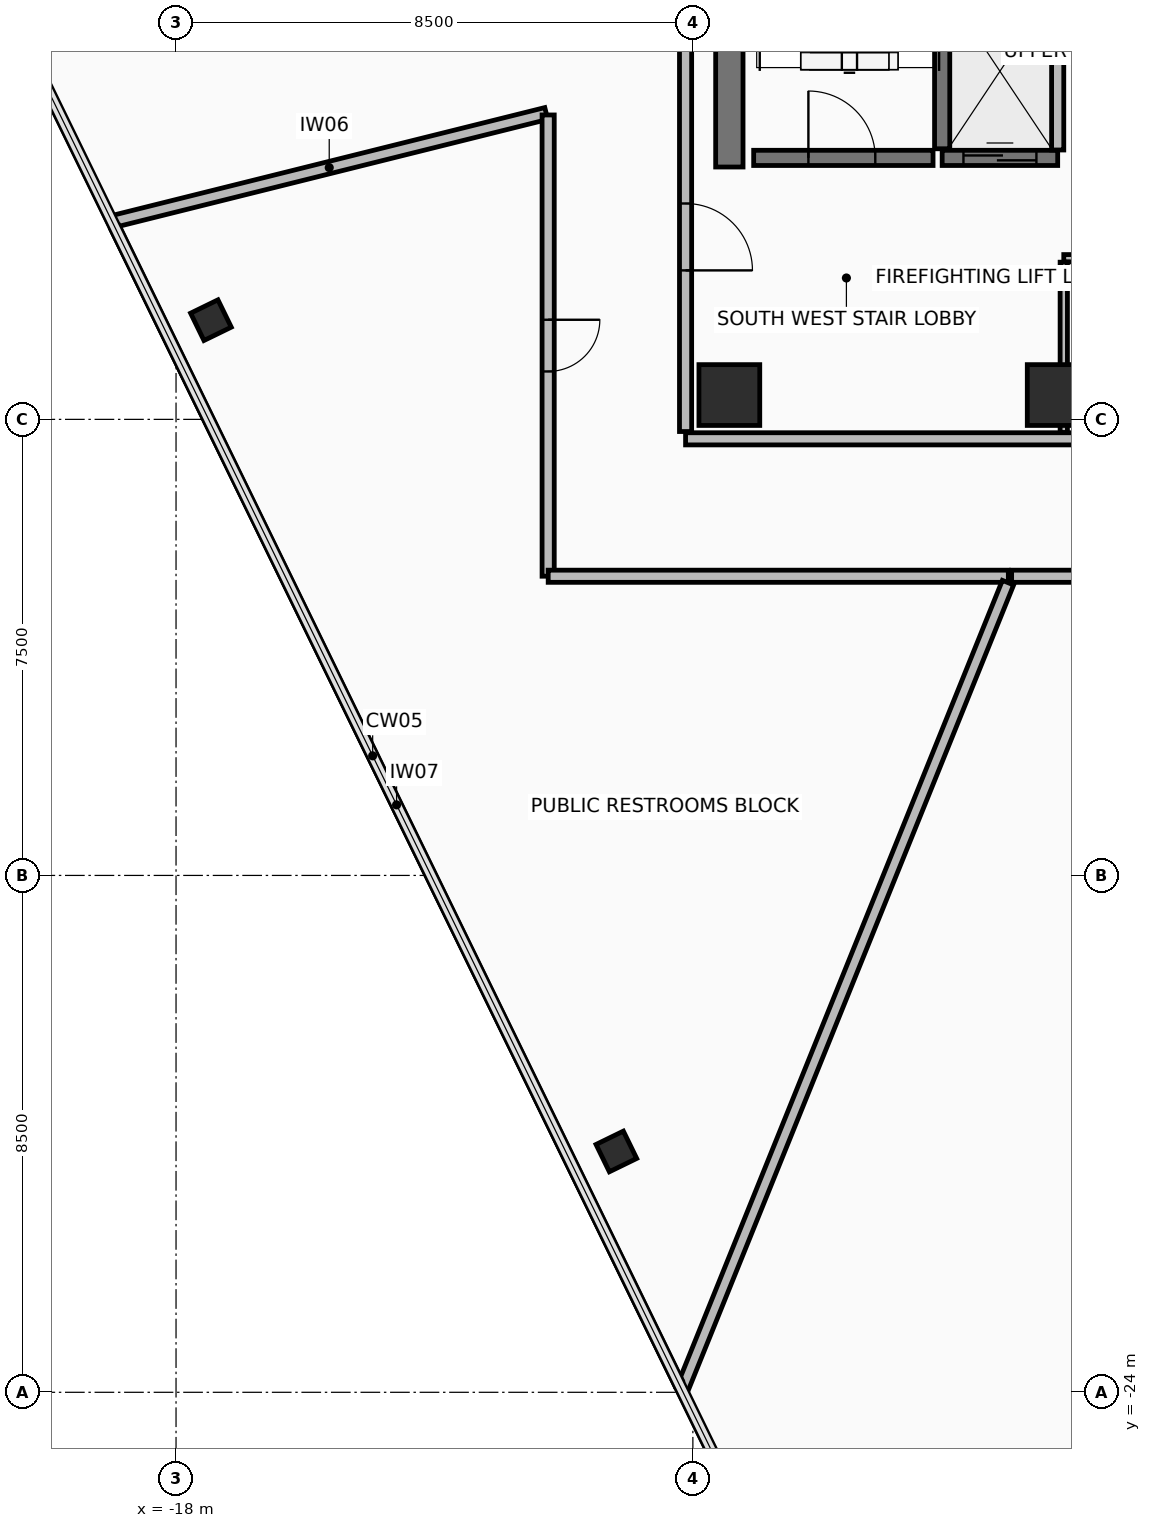
"""IFC4 building model, lengths in metres.
Left out: names, types, materials, properties, quantities, classifications, styles, units other than length and angle.
Written with IfcOpenShell. Run it as: python <this file> out.ifc"""

import sys

from ifc_helpers import new_model, si_unit, direction, frame, frame_2d, origin, origin_2d, place, context, subcontext, project, spatial, rectangle, hollow_rectangle, extrude, element, fill, save


model = new_model("IFC4")
c1 = context("Model", 3, precision=1e-05, world=origin(), true_north=direction((0.0, 1.0)))
c2 = subcontext(c1, "Body", "Model", "MODEL_VIEW")
j1 = project(units=[si_unit("LENGTHUNIT", "METRE"), si_unit("PLANEANGLEUNIT", "RADIAN")], contexts=[c1])
p1 = place(None, origin())
s1 = spatial("IfcSite", under=j1, at=p1, CompositionType="ELEMENT")
p2 = place(p1, origin())
s2 = spatial("IfcBuilding", under=s1, at=p2, CompositionType="ELEMENT")
p3 = place(p2, frame((0.0, 0.0, 248.65)))
s3 = spatial("IfcBuildingStorey", under=s2, at=p3, CompositionType="ELEMENT", Elevation=248.65)
for number, where, z_axis, x_axis in (
    (1, (-8.9, -7.6, 0.0), (0.0, 0.0, 1.0), (1.0, 0.0, 0.0)),
    (2, (-3.5, -7.6, 0.0), (0.0, 0.0, 1.0), (1.0, 0.0, 0.0)),
):
    element("IfcColumn", number, at=place(p3, frame(where, z_axis=z_axis, x_axis=x_axis)), inside=s3, PredefinedType="COLUMN", context=c2, shape_type="SweptSolid", body=[
        extrude(rectangle(XDim=1.0, YDim=1.0, at=origin_2d()), origin(), (0.0, 0.0, 1.0), 4.75),
    ])
for number, where, z_axis, x_axis in (
    (3, (-17.426, -6.369, 0.0), (0.0, 0.0, 1.0), (-0.438, 0.899, 0.0)),
    (4, (-10.758, -20.039, 0.0), (0.0, 0.0, 1.0), (-0.438, 0.899, 0.0)),
):
    element("IfcColumn", number, at=place(p3, frame(where, z_axis=z_axis, x_axis=x_axis)), inside=s3, PredefinedType="COLUMN", context=c2, shape_type="SweptSolid", body=[
        extrude(hollow_rectangle(XDim=0.5, YDim=0.5, WallThickness=0.032, at=origin_2d()), origin(), (0.0, 0.0, 1.0), 4.75),
    ])
p4 = place(p3, frame((-8.9, -3.85, 0.0), z_axis=(0.0, 0.0, 1.0), x_axis=(0.0, 1.0, 0.0)))
e5 = element("IfcWall", 5, at=p4, inside=s3, PredefinedType="SHEAR", context=c2, shape_type="SweptSolid", body=[
    extrude(rectangle(XDim=10.7, YDim=0.45, at=frame_2d((5.35, 0.0))), origin(), (0.0, 0.0, 1.0), 4.56),
])
p5 = place(p3, frame((-9.62, -8.32, 0.0), z_axis=(0.0, 0.0, 1.0), x_axis=(1.0, 0.0, 0.0)))
e6 = element("IfcWall", 6, at=p5, inside=s3, PredefinedType="PARTITIONING", context=c2, shape_type="SweptSolid", body=[
    extrude(rectangle(XDim=19.24, YDim=0.2, at=frame_2d((9.62, 0.0))), origin(), (0.0, 0.0, 1.0), 2.355),
])
p6 = place(p5, frame((7.37, 0.0, 0.0)))
e7 = element("IfcOpeningElement", 7, at=p6, cuts=e6, PredefinedType="OPENING", context=c2, shape_type="SweptSolid", body=[
    extrude(rectangle(XDim=0.9, YDim=2.1, at=frame_2d((0.45, 1.05))), frame((0.0, 0.11, 0.0), z_axis=(0.0, -1.0, 0.0), x_axis=(1.0, 0.0, 0.0)), (0.0, 0.0, 1.0), 0.22),
])
p7 = place(p5, frame((10.77, 0.0, 0.0)))
e8 = element("IfcOpeningElement", 8, at=p7, cuts=e6, PredefinedType="OPENING", context=c2, shape_type="SweptSolid", body=[
    extrude(rectangle(XDim=0.9, YDim=2.1, at=frame_2d((0.45, 1.05))), frame((0.0, 0.11, 0.0), z_axis=(0.0, -1.0, 0.0), x_axis=(1.0, 0.0, 0.0)), (0.0, 0.0, 1.0), 0.22),
])
p8 = place(p5, frame((13.97, 0.0, 0.0)))
e9 = element("IfcOpeningElement", 9, at=p8, cuts=e6, PredefinedType="OPENING", context=c2, shape_type="SweptSolid", body=[
    extrude(rectangle(XDim=0.9, YDim=2.1, at=frame_2d((0.45, 1.05))), frame((0.0, 0.11, 0.0), z_axis=(0.0, -1.0, 0.0), x_axis=(1.0, 0.0, 0.0)), (0.0, 0.0, 1.0), 0.22),
])
p9 = place(p3, frame((-9.62, 8.2, 0.0), z_axis=(0.0, 0.0, 1.0), x_axis=(0.0, -1.0, 0.0)))
e10 = element("IfcWall", 10, at=p9, inside=s3, PredefinedType="PARTITIONING", context=c2, shape_type="SweptSolid", body=[
    extrude(rectangle(XDim=16.4, YDim=0.2, at=frame_2d((8.2, 0.0))), origin(), (0.0, 0.0, 1.0), 2.355),
])
p10 = place(p9, frame((12.65, 0.0, 0.0)))
e11 = element("IfcOpeningElement", 11, at=p10, cuts=e10, PredefinedType="OPENING", context=c2, shape_type="SweptSolid", body=[
    extrude(rectangle(XDim=1.1, YDim=2.15, at=frame_2d((0.55, 1.075))), frame((0.0, 0.11, 0.0), z_axis=(0.0, -1.0, 0.0), x_axis=(1.0, 0.0, 0.0)), (0.0, 0.0, 1.0), 0.22),
])
p11 = place(p3, frame((-5.4, -3.55, 0.0), z_axis=(0.0, 0.0, 1.0), x_axis=(0.0, 1.0, 0.0)))
e12 = element("IfcWall", 12, at=p11, inside=s3, PredefinedType="SHEAR", context=c2, shape_type="SweptSolid", body=[
    extrude(rectangle(XDim=7.3, YDim=0.25, at=frame_2d((3.65, 0.0))), origin(), (0.0, 0.0, 1.0), 4.56),
])
p12 = place(p3, frame((-8.5, -3.7, 0.0), z_axis=(0.0, 0.0, 1.0), x_axis=(1.0, 0.0, 0.0)))
e13 = element("IfcWall", 13, at=p12, inside=s3, PredefinedType="SHEAR", context=c2, shape_type="SweptSolid", body=[
    extrude(rectangle(XDim=2.95, YDim=0.25, at=frame_2d((1.475, 0.0))), origin(), (0.0, 0.0, 1.0), 4.56),
])
p13 = place(p12, frame((0.9, 0.0, 0.0)))
e14 = element("IfcOpeningElement", 14, at=p13, cuts=e13, PredefinedType="OPENING", context=c2, shape_type="SweptSolid", body=[
    extrude(rectangle(XDim=1.1, YDim=2.15, at=frame_2d((0.55, 1.075))), frame((0.0, 0.135, 0.0), z_axis=(0.0, -1.0, 0.0), x_axis=(1.0, 0.0, 0.0)), (0.0, 0.0, 1.0), 0.27),
])
p14 = place(p3, frame((-5.4, -3.7, 0.0), z_axis=(0.0, 0.0, 1.0), x_axis=(1.0, 0.0, 0.0)))
e15 = element("IfcWall", 15, at=p14, inside=s3, PredefinedType="SHEAR", context=c2, shape_type="SweptSolid", body=[
    extrude(rectangle(XDim=1.9, YDim=0.25, at=frame_2d((0.95, 0.0))), origin(), (0.0, 0.0, 1.0), 4.56),
])
p15 = place(p14, frame((0.35, 0.0, 0.0)))
e16 = element("IfcOpeningElement", 16, at=p15, cuts=e15, PredefinedType="OPENING", context=c2, shape_type="SweptSolid", body=[
    extrude(rectangle(XDim=1.2, YDim=2.2, at=frame_2d((0.6, 1.1))), frame((0.0, 0.135, 0.0), z_axis=(0.0, -1.0, 0.0), x_axis=(1.0, 0.0, 0.0)), (0.0, 0.0, 1.0), 0.27),
])
p16 = place(p3, frame((-3.5, -3.57, 0.0), z_axis=(0.0, 0.0, 1.0), x_axis=(0.0, 1.0, 0.0)))
e17 = element("IfcWall", 17, at=p16, inside=s3, PredefinedType="PARTITIONING", context=c2, shape_type="SweptSolid", body=[
    extrude(rectangle(XDim=2.615, YDim=0.2, at=frame_2d((1.308, 0.0))), origin(), (0.0, 0.0, 1.0), 4.56),
])
p17 = place(p3, frame((-0.265, -5.35, 0.0), z_axis=(0.0, 0.0, 1.0), x_axis=(-1.0, 0.0, 0.0)))
e18 = element("IfcWall", 18, at=p17, inside=s3, PredefinedType="PARTITIONING", context=c2, shape_type="SweptSolid", body=[
    extrude(rectangle(XDim=3.135, YDim=0.12, at=frame_2d((1.567, 0.0))), origin(), (0.0, 0.0, 1.0), 3.855),
])
p18 = place(p3, frame((-3.4, -5.415, 0.0), z_axis=(0.0, 0.0, 1.0), x_axis=(0.0, -1.0, 0.0)))
e19 = element("IfcWall", 19, at=p18, inside=s3, PredefinedType="PARTITIONING", context=c2, shape_type="SweptSolid", body=[
    extrude(rectangle(XDim=2.8, YDim=0.12, at=frame_2d((1.4, 0.0))), origin(), (0.0, 0.0, 1.0), 2.355),
])
p19 = place(p3, frame((-19.05, -4.75, 0.0), z_axis=(0.0, 0.0, 1.0), x_axis=(0.970294553718, 0.241926598425, 0.0)))
e20 = element("IfcWall", 20, at=p19, inside=s3, PredefinedType="PARTITIONING", context=c2, shape_type="SweptSolid", body=[
    extrude(rectangle(XDim=7.358, YDim=0.2, at=frame_2d((3.679, 0.0))), origin(), (0.0, 0.0, 1.0), 2.255),
])
p20 = place(p3, frame((-11.88, -2.994, 0.0), z_axis=(0.0, 0.0, 1.0), x_axis=(0.0, -1.0, 0.0)))
e21 = element("IfcWall", 21, at=p20, inside=s3, PredefinedType="PARTITIONING", context=c2, shape_type="SweptSolid", body=[
    extrude(rectangle(XDim=7.585, YDim=0.2, at=frame_2d((3.793, 0.0))), origin(), (0.0, 0.0, 1.0), 2.755),
])
p21 = place(p20, frame((3.368, 0.0, 0.0)))
e22 = element("IfcOpeningElement", 22, at=p21, cuts=e21, PredefinedType="OPENING", context=c2, shape_type="SweptSolid", body=[
    extrude(rectangle(XDim=0.85, YDim=2.1, at=frame_2d((0.425, 1.05))), frame((0.0, 0.11, 0.0), z_axis=(0.0, -1.0, 0.0), x_axis=(1.0, 0.0, 0.0)), (0.0, 0.0, 1.0), 0.22),
])
p22 = place(p3, frame((-11.879, -10.58, 0.0), z_axis=(0.0, 0.0, 1.0), x_axis=(1.0, 0.0, 0.0)))
e23 = element("IfcWall", 23, at=p22, inside=s3, PredefinedType="PARTITIONING", context=c2, shape_type="SweptSolid", body=[
    extrude(rectangle(XDim=7.568, YDim=0.2, at=frame_2d((3.784, 0.0))), origin(), (0.0, 0.0, 1.0), 2.355),
])
p23 = place(p3, frame((-4.317, -10.685, 0.0), z_axis=(0.0, 0.0, 1.0), x_axis=(-0.374607677729, -0.927183416475, 0.0)))
e24 = element("IfcWall", 24, at=p23, inside=s3, PredefinedType="PARTITIONING", context=c2, shape_type="SweptSolid", body=[
    extrude(rectangle(XDim=14.318, YDim=0.2, at=frame_2d((7.159, 0.0))), origin(), (0.0, 0.0, 1.0), 2.255),
])
p24 = place(p3, frame((-9.742, -23.833, 0.0), z_axis=(0.0, 0.0, 1.0), x_axis=(-0.438371488373, 0.898793879697, 0.0)))
e25 = element("IfcWall", 25, at=p24, inside=s3, PredefinedType="PARTITIONING", context=c2, shape_type="SweptSolid", body=[
    extrude(rectangle(XDim=21.125, YDim=0.15, at=frame_2d((10.562, 0.0))), origin(), (0.0, 0.0, 1.0), 2.755),
])
p25 = place(p3, frame((-4.258, -10.58, 0.0), z_axis=(0.0, 0.0, 1.0), x_axis=(1.0, 0.0, 0.0)))
e26 = element("IfcWall", 26, at=p25, inside=s3, PredefinedType="PARTITIONING", context=c2, shape_type="SweptSolid", body=[
    extrude(rectangle(XDim=10.855, YDim=0.2, at=frame_2d((5.428, 0.0))), origin(), (0.0, 0.0, 1.0), 2.355),
])
p26 = place(p25, frame((4.928, 0.0, 0.0)))
e27 = element("IfcOpeningElement", 27, at=p26, cuts=e26, PredefinedType="OPENING", context=c2, shape_type="SweptSolid", body=[
    extrude(rectangle(XDim=1.0, YDim=2.15, at=frame_2d((0.5, 1.075))), frame((0.0, 0.11, 0.0), z_axis=(0.0, -1.0, 0.0), x_axis=(1.0, 0.0, 0.0)), (0.0, 0.0, 1.0), 0.22),
])
p27 = place(p10, frame((1.1, 0.0, 0.0), z_axis=(0.0, 0.0, 1.0), x_axis=(-1.0, 0.0, 0.0)))
e28 = element("IfcDoor", 28, at=p27, inside=s3, OperationType="SINGLE_SWING_LEFT", PredefinedType="DOOR", context=c2, shape_type="SweptSolid", body=[
    extrude(rectangle(XDim=1.1, YDim=2.15, at=frame_2d((0.55, 1.075))), frame((0.0, 0.025, 0.0), z_axis=(0.0, -1.0, 0.0), x_axis=(1.0, 0.0, 0.0)), (0.0, 0.0, 1.0), 0.05),
])
fill(e11, e28)
p28 = place(p13, origin())
e29 = element("IfcDoor", 29, at=p28, inside=s3, OperationType="SINGLE_SWING_LEFT", PredefinedType="DOOR", context=c2, shape_type="SweptSolid", body=[
    extrude(rectangle(XDim=1.1, YDim=2.15, at=frame_2d((0.55, 1.075))), frame((0.0, 0.025, 0.0), z_axis=(0.0, -1.0, 0.0), x_axis=(1.0, 0.0, 0.0)), (0.0, 0.0, 1.0), 0.05),
])
fill(e14, e29)
p29 = place(p15, origin())
e30 = element("IfcDoor", 30, at=p29, inside=s3, OperationType="SLIDING_TO_RIGHT", PredefinedType="DOOR", context=c2, shape_type="SweptSolid", body=[
    extrude(rectangle(XDim=1.2, YDim=2.2, at=frame_2d((0.6, 1.1))), frame((0.0, 0.025, 0.0), z_axis=(0.0, -1.0, 0.0), x_axis=(1.0, 0.0, 0.0)), (0.0, 0.0, 1.0), 0.05),
])
fill(e16, e30)
p30 = place(p21, origin())
e31 = element("IfcDoor", 31, at=p30, inside=s3, OperationType="SINGLE_SWING_RIGHT", PredefinedType="DOOR", context=c2, shape_type="SweptSolid", body=[
    extrude(rectangle(XDim=0.85, YDim=2.1, at=frame_2d((0.425, 1.05))), frame((0.0, 0.025, 0.0), z_axis=(0.0, -1.0, 0.0), x_axis=(1.0, 0.0, 0.0)), (0.0, 0.0, 1.0), 0.05),
])
fill(e22, e31)
save(model, sys.argv[1])
